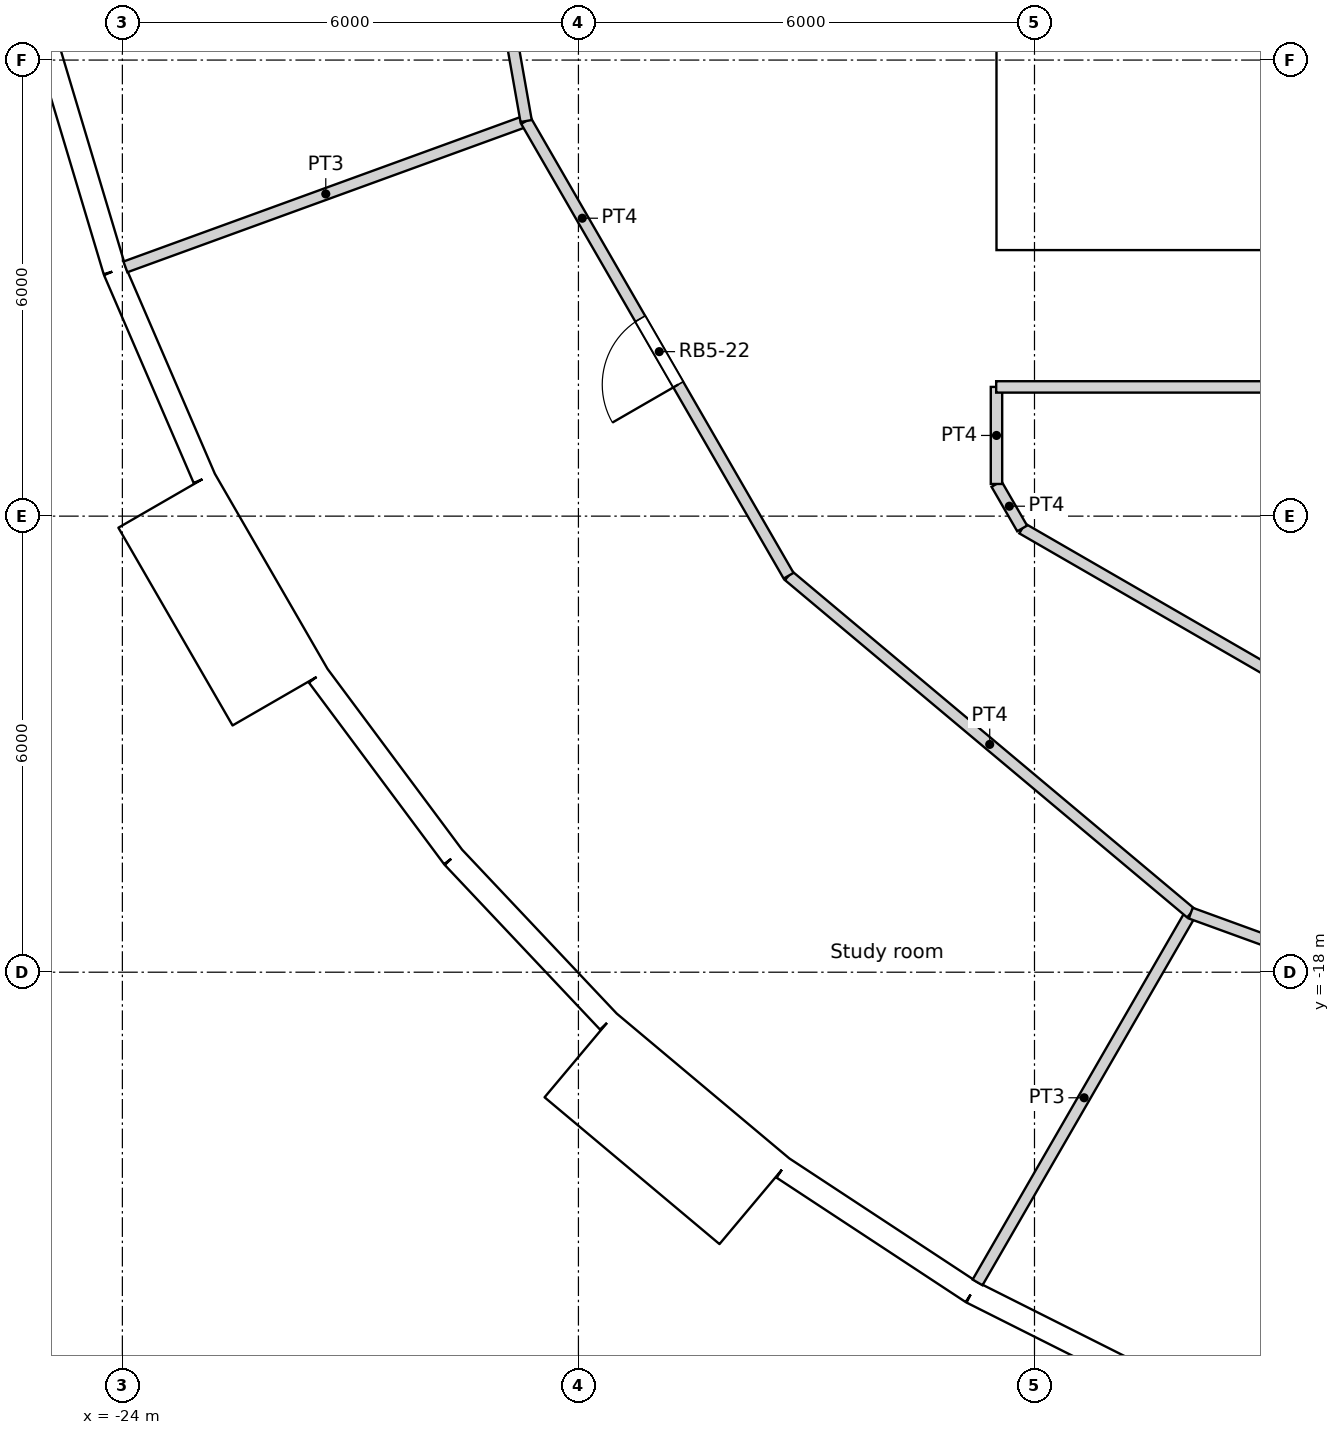
"""IFC4 building model, lengths in metres.
Left out: names, types, materials, properties, quantities, classifications, styles, units other than length and angle.
Written with IfcOpenShell. Run it as: python <this file> out.ifc"""

import sys

from ifc_helpers import new_model, si_unit, direction, frame, frame_2d, origin, origin_2d, place, context, subcontext, project, spatial, rectangle, circle, extrude, element, fill, save


model = new_model("IFC4")
c1 = context("Model", 3, precision=1e-05, world=origin(), true_north=direction((0.0, 1.0)))
c2 = subcontext(c1, "Body", "Model", "MODEL_VIEW")
j1 = project(units=[si_unit("LENGTHUNIT", "METRE"), si_unit("PLANEANGLEUNIT", "RADIAN")], contexts=[c1])
p1 = place(None, origin())
s1 = spatial("IfcSite", under=j1, at=p1, CompositionType="ELEMENT")
p2 = place(p1, origin())
s2 = spatial("IfcBuilding", under=s1, at=p2, CompositionType="ELEMENT")
p3 = place(p2, frame((0.0, 0.0, 169.2)))
s3 = spatial("IfcBuildingStorey", under=s2, at=p3, CompositionType="ELEMENT", Elevation=169.2)
for number, where, z_axis, x_axis in (
    (1, (-23.067, -8.396, 0.0), (0.0, 0.0, 1.0), (1.0, 0.0, 0.0)),
    (2, (-20.509, -13.489, 0.0), (0.0, 0.0, 1.0), (1.0, 0.0, 0.0)),
    (3, (-16.846, -17.855, 0.0), (0.0, 0.0, 1.0), (1.0, 0.0, 0.0)),
    (4, (-12.274, -21.259, 0.0), (0.0, 0.0, 1.0), (1.0, 0.0, 0.0)),
):
    element("IfcColumn", number, at=place(p3, frame(where, z_axis=z_axis, x_axis=x_axis)), inside=s3, PredefinedType="COLUMN", context=c2, shape_type="SweptSolid", body=[
        extrude(circle(Radius=0.6, at=origin_2d()), origin(), (0.0, 0.0, 1.0), 3.6),
    ])
for number, where, z_axis, x_axis in (
    (5, (-16.958, -8.167, 0.0), (0.0, 0.0, 1.0), (1.0, 0.0, 0.0)),
    (6, (-13.798, -12.802, 0.0), (0.0, 0.0, 1.0), (1.0, 0.0, 0.0)),
    (7, (-9.411, -16.301, 0.0), (0.0, 0.0, 1.0), (1.0, 0.0, 0.0)),
):
    element("IfcColumn", number, at=place(p3, frame(where, z_axis=z_axis, x_axis=x_axis)), inside=s3, PredefinedType="COLUMN", context=c2, shape_type="SweptSolid", body=[
        extrude(circle(Radius=0.65, at=origin_2d()), origin(), (0.0, 0.0, 1.0), 3.6),
    ])
p4 = place(p3, frame((-26.042, -3.069, -0.3), z_axis=(0.0, 0.0, 1.0), x_axis=(0.173669267716, -0.984804034035, 0.0)))
e8 = element("IfcWall", 8, at=p4, inside=s3, PredefinedType="ELEMENTEDWALL", context=c2, shape_type="SweptSolid", body=[
    extrude(rectangle(XDim=3.0, YDim=1.45, at=frame_2d((1.5, 0.0))), origin(), (0.0, 0.0, 1.0), 3.6),
])
p5 = place(p4, frame((1.5, 0.0, 1.85)))
e9 = element("IfcOpeningElement", 9, at=p5, cuts=e8, PredefinedType="OPENING", context=c2, shape_type="SweptSolid", body=[
    extrude(circle(Radius=0.9, at=origin_2d()), frame((0.0, 0.735, 0.0), z_axis=(0.0, -1.0, 0.0), x_axis=(1.0, 0.0, 0.0)), (0.0, 0.0, 1.0), 1.47),
])
p6 = place(p3, frame((-24.953, -5.924, 0.0), z_axis=(0.0, 0.0, 1.0), x_axis=(0.286782750849, -0.957995643944, 0.0)))
e10 = element("IfcWall", 10, at=p6, inside=s3, PredefinedType="SOLIDWALL", context=c2, shape_type="SweptSolid", body=[
    extrude(rectangle(XDim=2.973, YDim=0.3, at=frame_2d((1.486, 0.0))), origin(), (0.0, 0.0, 1.0), 3.3),
])
p7 = place(p6, frame((1.486, 0.0, 1.55)))
e11 = element("IfcOpeningElement", 11, at=p7, cuts=e10, PredefinedType="OPENING", context=c2, shape_type="SweptSolid", body=[
    extrude(circle(Radius=0.9, at=origin_2d()), frame((0.0, 0.16, 0.0), z_axis=(0.0, -1.0, 0.0), x_axis=(1.0, 0.0, 0.0)), (0.0, 0.0, 1.0), 0.32),
])
p8 = place(p3, frame((-24.101, -8.772, 0.0), z_axis=(0.0, 0.0, 1.0), x_axis=(0.396148129016, -0.918186614952, 0.0)))
e12 = element("IfcWall", 12, at=p8, inside=s3, PredefinedType="SOLIDWALL", context=c2, shape_type="SweptSolid", body=[
    extrude(rectangle(XDim=2.973, YDim=0.3, at=frame_2d((1.486, 0.0))), origin(), (0.0, 0.0, 1.0), 3.3),
])
p9 = place(p8, frame((1.486, 0.0, 1.55)))
e13 = element("IfcOpeningElement", 13, at=p9, cuts=e12, PredefinedType="OPENING", context=c2, shape_type="SweptSolid", body=[
    extrude(circle(Radius=0.9, at=origin_2d()), frame((0.0, 0.16, 0.0), z_axis=(0.0, -1.0, 0.0), x_axis=(1.0, 0.0, 0.0)), (0.0, 0.0, 1.0), 0.32),
])
p10 = place(p3, frame((-23.422, -11.791, -0.3), z_axis=(0.0, 0.0, 1.0), x_axis=(0.499990139034, -0.866031096941, 0.0)))
e14 = element("IfcWall", 14, at=p10, inside=s3, PredefinedType="ELEMENTEDWALL", context=c2, shape_type="SweptSolid", body=[
    extrude(rectangle(XDim=3.0, YDim=1.45, at=frame_2d((1.5, 0.0))), origin(), (0.0, 0.0, 1.0), 3.6),
])
p11 = place(p10, frame((1.5, 0.0, 1.85)))
e15 = element("IfcOpeningElement", 15, at=p11, cuts=e14, PredefinedType="OPENING", context=c2, shape_type="SweptSolid", body=[
    extrude(circle(Radius=0.9, at=origin_2d()), frame((0.0, 0.735, 0.0), z_axis=(0.0, -1.0, 0.0), x_axis=(1.0, 0.0, 0.0)), (0.0, 0.0, 1.0), 1.47),
])
p12 = place(p3, frame((-21.422, -14.101, 0.0), z_axis=(0.0, 0.0, 1.0), x_axis=(0.597197580538, -0.80209416517, 0.0)))
e16 = element("IfcWall", 16, at=p12, inside=s3, PredefinedType="SOLIDWALL", context=c2, shape_type="SweptSolid", body=[
    extrude(rectangle(XDim=2.973, YDim=0.3, at=frame_2d((1.486, 0.0))), origin(), (0.0, 0.0, 1.0), 3.3),
])
p13 = place(p12, frame((1.486, 0.0, 1.55)))
e17 = element("IfcOpeningElement", 17, at=p13, cuts=e16, PredefinedType="OPENING", context=c2, shape_type="SweptSolid", body=[
    extrude(circle(Radius=0.9, at=origin_2d()), frame((0.0, 0.16, 0.0), z_axis=(0.0, -1.0, 0.0), x_axis=(1.0, 0.0, 0.0)), (0.0, 0.0, 1.0), 0.32),
])
p14 = place(p3, frame((-19.647, -16.486, 0.0), z_axis=(0.0, 0.0, 1.0), x_axis=(0.686235184166, -0.727379730273, 0.0)))
e18 = element("IfcWall", 18, at=p14, inside=s3, PredefinedType="SOLIDWALL", context=c2, shape_type="SweptSolid", body=[
    extrude(rectangle(XDim=2.973, YDim=0.3, at=frame_2d((1.486, 0.0))), origin(), (0.0, 0.0, 1.0), 3.3),
])
p15 = place(p14, frame((1.486, 0.0, 1.55)))
e19 = element("IfcOpeningElement", 19, at=p15, cuts=e18, PredefinedType="OPENING", context=c2, shape_type="SweptSolid", body=[
    extrude(circle(Radius=0.9, at=origin_2d()), frame((0.0, 0.16, 0.0), z_axis=(0.0, -1.0, 0.0), x_axis=(1.0, 0.0, 0.0)), (0.0, 0.0, 1.0), 0.32),
])
p16 = place(p3, frame((-17.977, -19.09, -0.3), z_axis=(0.0, 0.0, 1.0), x_axis=(0.766022196139, -0.642814121673, 0.0)))
e20 = element("IfcWall", 20, at=p16, inside=s3, PredefinedType="ELEMENTEDWALL", context=c2, shape_type="SweptSolid", body=[
    extrude(rectangle(XDim=3.0, YDim=1.45, at=frame_2d((1.5, 0.0))), origin(), (0.0, 0.0, 1.0), 3.6),
])
p17 = place(p16, frame((1.5, 0.0, 1.85)))
e21 = element("IfcOpeningElement", 21, at=p17, cuts=e20, PredefinedType="OPENING", context=c2, shape_type="SweptSolid", body=[
    extrude(circle(Radius=0.9, at=origin_2d()), frame((0.0, 0.735, 0.0), z_axis=(0.0, -1.0, 0.0), x_axis=(1.0, 0.0, 0.0)), (0.0, 0.0, 1.0), 1.47),
])
p18 = place(p3, frame((-15.308, -20.578, 0.0), z_axis=(0.0, 0.0, 1.0), x_axis=(0.835470659512, -0.549535055382, 0.0)))
e22 = element("IfcWall", 22, at=p18, inside=s3, PredefinedType="SOLIDWALL", context=c2, shape_type="SweptSolid", body=[
    extrude(rectangle(XDim=2.973, YDim=0.3, at=frame_2d((1.487, 0.0))), origin(), (0.0, 0.0, 1.0), 3.3),
])
p19 = place(p18, frame((1.486, 0.0, 1.55)))
e23 = element("IfcOpeningElement", 23, at=p19, cuts=e22, PredefinedType="OPENING", context=c2, shape_type="SweptSolid", body=[
    extrude(circle(Radius=0.9, at=origin_2d()), frame((0.0, 0.16, 0.0), z_axis=(0.0, -1.0, 0.0), x_axis=(1.0, 0.0, 0.0)), (0.0, 0.0, 1.0), 0.32),
])
p20 = place(p3, frame((-12.824, -22.211, 0.0), z_axis=(0.0, 0.0, 1.0), x_axis=(0.893637442555, -0.448789618045, 0.0)))
e24 = element("IfcWall", 24, at=p20, inside=s3, PredefinedType="SOLIDWALL", context=c2, shape_type="SweptSolid", body=[
    extrude(rectangle(XDim=2.973, YDim=0.3, at=frame_2d((1.486, 0.0))), origin(), (0.0, 0.0, 1.0), 3.3),
])
p21 = place(p20, frame((1.486, 0.0, 1.55)))
e25 = element("IfcOpeningElement", 25, at=p21, cuts=e24, PredefinedType="OPENING", context=c2, shape_type="SweptSolid", body=[
    extrude(circle(Radius=0.9, at=origin_2d()), frame((0.0, 0.16, 0.0), z_axis=(0.0, -1.0, 0.0), x_axis=(1.0, 0.0, 0.0)), (0.0, 0.0, 1.0), 0.32),
])
p22 = place(p3, frame((-12.5, -8.05, 0.0), z_axis=(0.0, 0.0, 1.0), x_axis=(1.0, 0.0, 0.0)))
e26 = element("IfcWall", 26, at=p22, inside=s3, PredefinedType="SOLIDWALL", context=c2, shape_type="SweptSolid", body=[
    extrude(rectangle(XDim=25.0, YDim=0.9, at=frame_2d((12.5, 0.0))), origin(), (0.0, 0.0, 1.0), 3.6),
])
p23 = place(p22, frame((13.4, 0.0, 0.0)))
e27 = element("IfcOpeningElement", 27, at=p23, cuts=e26, PredefinedType="OPENING", context=c2, shape_type="SweptSolid", body=[
    extrude(rectangle(XDim=1.0, YDim=2.1, at=frame_2d((0.5, 1.05))), frame((0.0, 0.45, 0.0), z_axis=(0.0, -1.0, 0.0), x_axis=(1.0, 0.0, 0.0)), (0.0, 0.0, 1.0), 0.9),
])
p24 = place(p22, frame((8.3, 0.0, 0.0)))
e28 = element("IfcOpeningElement", 28, at=p24, cuts=e26, PredefinedType="OPENING", context=c2, shape_type="SweptSolid", body=[
    extrude(rectangle(XDim=1.8, YDim=2.1, at=frame_2d((0.9, 1.05))), frame((0.0, 0.45, 0.0), z_axis=(0.0, -1.0, 0.0), x_axis=(1.0, 0.0, 0.0)), (0.0, 0.0, 1.0), 0.9),
])
p25 = place(p22, frame((14.9, 0.0, 0.0)))
e29 = element("IfcOpeningElement", 29, at=p25, cuts=e26, PredefinedType="OPENING", context=c2, shape_type="SweptSolid", body=[
    extrude(rectangle(XDim=1.8, YDim=2.1, at=frame_2d((0.9, 1.05))), frame((0.0, 0.45, 0.0), z_axis=(0.0, -1.0, 0.0), x_axis=(1.0, 0.0, 0.0)), (0.0, 0.0, 1.0), 0.9),
])
p26 = place(p3, frame((-12.05, -7.6, 0.0), z_axis=(0.0, 0.0, 1.0), x_axis=(0.0, 1.0, 0.0)))
e30 = element("IfcWall", 30, at=p26, inside=s3, PredefinedType="SOLIDWALL", context=c2, shape_type="SweptSolid", body=[
    extrude(rectangle(XDim=15.2, YDim=0.9, at=frame_2d((7.6, 0.0))), origin(), (0.0, 0.0, 1.0), 3.6),
])
p27 = place(p26, frame((7.1, 0.0, 0.0)))
e31 = element("IfcOpeningElement", 31, at=p27, cuts=e30, PredefinedType="OPENING", context=c2, shape_type="SweptSolid", body=[
    extrude(rectangle(XDim=1.0, YDim=2.1, at=frame_2d((0.5, 1.05))), frame((0.0, 0.45, 0.0), z_axis=(0.0, -1.0, 0.0), x_axis=(1.0, 0.0, 0.0)), (0.0, 0.0, 1.0), 0.9),
])
p28 = place(p3, frame((-9.05, -7.0, 0.0), z_axis=(0.0, 0.0, 1.0), x_axis=(0.0, 1.0, 0.0)))
e32 = element("IfcWall", 32, at=p28, inside=s3, PredefinedType="SOLIDWALL", context=c2, shape_type="SweptSolid", body=[
    extrude(rectangle(XDim=14.6, YDim=0.3, at=frame_2d((7.3, 0.0))), origin(), (0.0, 0.0, 1.0), 3.3),
])
p29 = place(p3, frame((-9.05, -7.15, 0.0), z_axis=(0.0, 0.0, 1.0), x_axis=(1.0, 0.0, 0.0)))
e33 = element("IfcWall", 33, at=p29, inside=s3, PredefinedType="SOLIDWALL", context=c2, shape_type="SweptSolid", body=[
    extrude(rectangle(XDim=4.85, YDim=0.9, at=frame_2d((2.425, 0.0))), origin(), (0.0, 0.0, 1.0), 3.3),
])
p30 = place(p3, frame((-12.504, -10.3, 0.0), z_axis=(0.0, 0.0, 1.0), x_axis=(1.0, 0.0, 0.0)))
e34 = element("IfcWall", 34, at=p30, inside=s3, PredefinedType="PARTITIONING", context=c2, shape_type="SweptSolid", body=[
    extrude(rectangle(XDim=7.687, YDim=0.15, at=frame_2d((3.844, 0.0))), origin(), (0.0, 0.0, 1.0), 3.3),
])
p31 = place(p3, frame((-12.5, -11.577, 0.0), z_axis=(0.0, 0.0, 1.0), x_axis=(0.0, 1.0, 0.0)))
e35 = element("IfcWall", 35, at=p31, inside=s3, PredefinedType="PARTITIONING", context=c2, shape_type="SweptSolid", body=[
    extrude(rectangle(XDim=1.277, YDim=0.15, at=frame_2d((0.638, 0.0))), origin(), (0.0, 0.0, 1.0), 3.3),
])
p32 = place(p3, frame((-12.5, -11.577, 0.0), z_axis=(0.0, 0.0, 1.0), x_axis=(0.500024767483, -0.866011103799, 0.0)))
e36 = element("IfcWall", 36, at=p32, inside=s3, PredefinedType="PARTITIONING", context=c2, shape_type="SweptSolid", body=[
    extrude(rectangle(XDim=0.676, YDim=0.15, at=frame_2d((0.338, 0.0))), origin(), (0.0, 0.0, 1.0), 3.3),
])
p33 = place(p3, frame((-19.888, 0.0, 0.0), z_axis=(0.0, 0.0, 1.0), x_axis=(0.173728873845, -0.98479352069, 0.0)))
e37 = element("IfcWall", 37, at=p33, inside=s3, PredefinedType="PARTITIONING", context=c2, shape_type="SweptSolid", body=[
    extrude(rectangle(XDim=6.907, YDim=0.15, at=frame_2d((3.454, 0.0))), origin(), (0.0, 0.0, 1.0), 3.3),
])
p34 = place(p33, frame((4.003, 0.0, 0.0)))
e38 = element("IfcOpeningElement", 38, at=p34, cuts=e37, PredefinedType="OPENING", context=c2, shape_type="SweptSolid", body=[
    extrude(rectangle(XDim=1.0, YDim=2.04, at=frame_2d((0.5, 1.02))), frame((0.0, 0.075, 0.0), z_axis=(0.0, -1.0, 0.0), x_axis=(1.0, 0.0, 0.0)), (0.0, 0.0, 1.0), 0.15),
])
p35 = place(p3, frame((-15.235, -12.784, 0.0), z_axis=(0.0, 0.0, 1.0), x_axis=(0.766192104565, -0.642611592567, 0.0)))
e39 = element("IfcWall", 39, at=p35, inside=s3, PredefinedType="PARTITIONING", context=c2, shape_type="SweptSolid", body=[
    extrude(rectangle(XDim=6.906, YDim=0.15, at=frame_2d((3.453, 0.0))), origin(), (0.0, 0.0, 1.0), 3.3),
])
p36 = place(p3, frame((-18.688, -6.802, 0.0), z_axis=(0.0, 0.0, 1.0), x_axis=(0.499914202267, -0.866074933462, 0.0)))
e40 = element("IfcWall", 40, at=p36, inside=s3, PredefinedType="PARTITIONING", context=c2, shape_type="SweptSolid", body=[
    extrude(rectangle(XDim=6.907, YDim=0.15, at=frame_2d((3.454, 0.0))), origin(), (0.0, 0.0, 1.0), 3.3),
])
p37 = place(p36, frame((3.003, 0.0, 0.0)))
e41 = element("IfcOpeningElement", 41, at=p37, cuts=e40, PredefinedType="OPENING", context=c2, shape_type="SweptSolid", body=[
    extrude(rectangle(XDim=1.0, YDim=2.04, at=frame_2d((0.5, 1.02))), frame((0.0, 0.075, 0.0), z_axis=(0.0, -1.0, 0.0), x_axis=(1.0, 0.0, 0.0)), (0.0, 0.0, 1.0), 0.15),
])
p38 = place(p3, frame((-12.162, -12.162, 0.0), z_axis=(0.0, 0.0, 1.0), x_axis=(0.866004766557, -0.500035743023, 0.0)))
e42 = element("IfcWall", 42, at=p38, inside=s3, PredefinedType="PARTITIONING", context=c2, shape_type="SweptSolid", body=[
    extrude(rectangle(XDim=8.477, YDim=0.15, at=frame_2d((4.239, 0.0))), origin(), (0.0, 0.0, 1.0), 3.3),
])
p39 = place(p38, frame((3.763, 0.0, 0.0)))
e43 = element("IfcOpeningElement", 43, at=p39, cuts=e42, PredefinedType="OPENING", context=c2, shape_type="SweptSolid", body=[
    extrude(rectangle(XDim=0.95, YDim=2.1, at=frame_2d((0.475, 1.05))), frame((0.0, 0.075, 0.0), z_axis=(0.0, -1.0, 0.0), x_axis=(1.0, 0.0, 0.0)), (0.0, 0.0, 1.0), 0.15),
])
p40 = place(p3, frame((-9.944, -17.223, 0.0), z_axis=(0.0, 0.0, 1.0), x_axis=(0.939672634566, -0.342075050021, 0.0)))
e44 = element("IfcWall", 44, at=p40, inside=s3, PredefinedType="PARTITIONING", context=c2, shape_type="SweptSolid", body=[
    extrude(rectangle(XDim=6.908, YDim=0.15, at=frame_2d((3.454, 0.0))), origin(), (0.0, 0.0, 1.0), 3.3),
])
p41 = place(p40, frame((2.954, 0.0, 0.0)))
e45 = element("IfcOpeningElement", 45, at=p41, cuts=e44, PredefinedType="OPENING", context=c2, shape_type="SweptSolid", body=[
    extrude(rectangle(XDim=1.0, YDim=2.04, at=frame_2d((0.5, 1.02))), frame((0.0, 0.075, 0.0), z_axis=(0.0, -1.0, 0.0), x_axis=(1.0, 0.0, 0.0)), (0.0, 0.0, 1.0), 0.15),
])
p42 = place(p3, frame((-23.96, -8.721, 0.0), z_axis=(0.0, 0.0, 1.0), x_axis=(0.939686652043, 0.342036541866, 0.0)))
e46 = element("IfcWall", 46, at=p42, inside=s3, PredefinedType="PARTITIONING", context=c2, shape_type="SweptSolid", body=[
    extrude(rectangle(XDim=5.61, YDim=0.15, at=frame_2d((2.805, 0.0))), origin(), (0.0, 0.0, 1.0), 3.3),
])
p43 = place(p3, frame((-12.749, -22.081, 0.0), z_axis=(0.0, 0.0, 1.0), x_axis=(0.500010020406, 0.866019618423, 0.0)))
e47 = element("IfcWall", 47, at=p43, inside=s3, PredefinedType="PARTITIONING", context=c2, shape_type="SweptSolid", body=[
    extrude(rectangle(XDim=5.61, YDim=0.15, at=frame_2d((2.805, 0.0))), origin(), (0.0, 0.0, 1.0), 3.3),
])
p44 = place(p7, origin())
e48 = element("IfcWindow", 48, at=p44, inside=s3, PartitioningType="SINGLE_PANEL", PredefinedType="WINDOW", context=c2, shape_type="SweptSolid", body=[
    extrude(circle(Radius=0.9, at=origin_2d()), frame((0.0, 0.12, 0.0), z_axis=(0.0, -1.0, 0.0), x_axis=(1.0, 0.0, 0.0)), (0.0, 0.0, 1.0), 0.1),
])
fill(e11, e48)
p45 = place(p9, origin())
e49 = element("IfcWindow", 49, at=p45, inside=s3, PartitioningType="SINGLE_PANEL", PredefinedType="WINDOW", context=c2, shape_type="SweptSolid", body=[
    extrude(circle(Radius=0.9, at=origin_2d()), frame((0.0, 0.12, 0.0), z_axis=(0.0, -1.0, 0.0), x_axis=(1.0, 0.0, 0.0)), (0.0, 0.0, 1.0), 0.1),
])
fill(e13, e49)
p46 = place(p11, origin())
e50 = element("IfcWindow", 50, at=p46, inside=s3, PartitioningType="SINGLE_PANEL", PredefinedType="WINDOW", context=c2, shape_type="SweptSolid", body=[
    extrude(circle(Radius=0.9, at=origin_2d()), frame((0.0, 0.695, 0.0), z_axis=(0.0, -1.0, 0.0), x_axis=(1.0, 0.0, 0.0)), (0.0, 0.0, 1.0), 0.1),
])
fill(e15, e50)
p47 = place(p13, origin())
e51 = element("IfcWindow", 51, at=p47, inside=s3, PartitioningType="SINGLE_PANEL", PredefinedType="WINDOW", context=c2, shape_type="SweptSolid", body=[
    extrude(circle(Radius=0.9, at=origin_2d()), frame((0.0, 0.12, 0.0), z_axis=(0.0, -1.0, 0.0), x_axis=(1.0, 0.0, 0.0)), (0.0, 0.0, 1.0), 0.1),
])
fill(e17, e51)
p48 = place(p15, origin())
e52 = element("IfcWindow", 52, at=p48, inside=s3, PartitioningType="SINGLE_PANEL", PredefinedType="WINDOW", context=c2, shape_type="SweptSolid", body=[
    extrude(circle(Radius=0.9, at=origin_2d()), frame((0.0, 0.12, 0.0), z_axis=(0.0, -1.0, 0.0), x_axis=(1.0, 0.0, 0.0)), (0.0, 0.0, 1.0), 0.1),
])
fill(e19, e52)
p49 = place(p17, origin())
e53 = element("IfcWindow", 53, at=p49, inside=s3, PartitioningType="SINGLE_PANEL", PredefinedType="WINDOW", context=c2, shape_type="SweptSolid", body=[
    extrude(circle(Radius=0.9, at=origin_2d()), frame((0.0, 0.695, 0.0), z_axis=(0.0, -1.0, 0.0), x_axis=(1.0, 0.0, 0.0)), (0.0, 0.0, 1.0), 0.1),
])
fill(e21, e53)
p50 = place(p19, origin())
e54 = element("IfcWindow", 54, at=p50, inside=s3, PartitioningType="SINGLE_PANEL", PredefinedType="WINDOW", context=c2, shape_type="SweptSolid", body=[
    extrude(circle(Radius=0.9, at=origin_2d()), frame((0.0, 0.12, 0.0), z_axis=(0.0, -1.0, 0.0), x_axis=(1.0, 0.0, 0.0)), (0.0, 0.0, 1.0), 0.1),
])
fill(e23, e54)
p51 = place(p21, origin())
e55 = element("IfcWindow", 55, at=p51, inside=s3, PartitioningType="SINGLE_PANEL", PredefinedType="WINDOW", context=c2, shape_type="SweptSolid", body=[
    extrude(circle(Radius=0.9, at=origin_2d()), frame((0.0, 0.12, 0.0), z_axis=(0.0, -1.0, 0.0), x_axis=(1.0, 0.0, 0.0)), (0.0, 0.0, 1.0), 0.1),
])
fill(e25, e55)
p52 = place(p37, origin())
e56 = element("IfcDoor", 56, at=p52, inside=s3, OperationType="SINGLE_SWING_LEFT", PredefinedType="DOOR", context=c2, shape_type="SweptSolid", body=[
    extrude(rectangle(XDim=1.0, YDim=2.04, at=frame_2d((0.5, 1.02))), frame((0.0, 0.025, 0.0), z_axis=(0.0, -1.0, 0.0), x_axis=(1.0, 0.0, 0.0)), (0.0, 0.0, 1.0), 0.05),
])
fill(e41, e56)
save(model, sys.argv[1])
